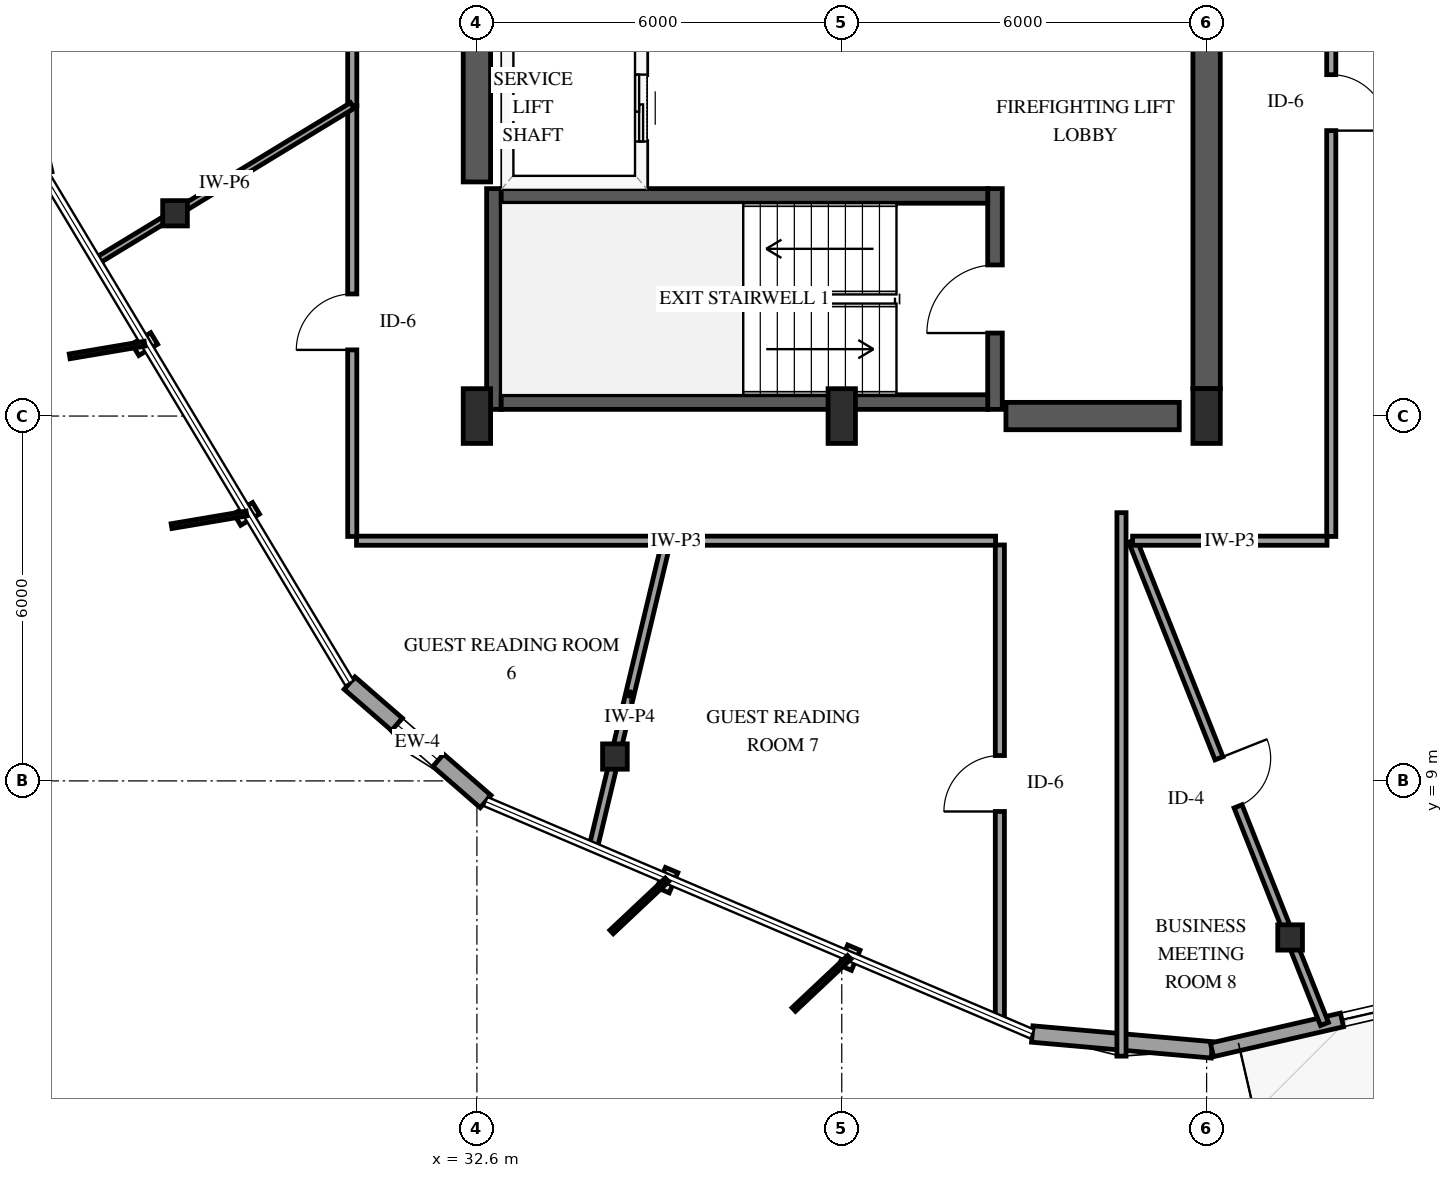
"""IFC4 building model, lengths in metres.
Left out: names, types, materials, properties, quantities, classifications, styles, units other than length and angle.
Written with IfcOpenShell. Run it as: python <this file> out.ifc"""

import sys

from ifc_helpers import new_model, si_unit, direction, frame, frame_2d, origin, origin_2d, place, context, subcontext, project, spatial, rectangle, i_section, extrude, element, fill, save


model = new_model("IFC4")
c1 = context("Model", 3, precision=1e-05, world=origin(), true_north=direction((0.0, 1.0)))
c2 = subcontext(c1, "Body", "Model", "MODEL_VIEW")
j1 = project(units=[si_unit("LENGTHUNIT", "METRE"), si_unit("PLANEANGLEUNIT", "RADIAN")], contexts=[c1])
p1 = place(None, origin())
s1 = spatial("IfcSite", under=j1, at=p1, CompositionType="ELEMENT")
p2 = place(p1, origin())
s2 = spatial("IfcBuilding", under=s1, at=p2, CompositionType="ELEMENT")
p3 = place(p2, frame((0.0, 0.0, 212.2)))
s3 = spatial("IfcBuildingStorey", under=s2, at=p3, CompositionType="ELEMENT", Elevation=212.2)
p4 = place(p3, frame((32.88, 15.11, 0.0), z_axis=(0.0, 0.0, 1.0), x_axis=(0.0, 1.0, 0.0)))
e1 = element("IfcWall", 1, at=p4, inside=s3, PredefinedType="SHEAR", context=c2, shape_type="SweptSolid", body=[
    extrude(rectangle(XDim=3.63, YDim=0.24, at=frame_2d((1.815, 0.0))), origin(), (0.0, 0.0, 1.0), 3.6),
])
p5 = place(p3, frame((41.12, 15.11, 0.0), z_axis=(0.0, 0.0, 1.0), x_axis=(0.0, 1.0, 0.0)))
e2 = element("IfcWall", 2, at=p5, inside=s3, PredefinedType="SHEAR", context=c2, shape_type="SweptSolid", body=[
    extrude(rectangle(XDim=3.63, YDim=0.24, at=frame_2d((1.815, 0.0))), origin(), (0.0, 0.0, 1.0), 3.6),
])
p6 = place(p5, frame((1.255, 0.0, 0.0)))
e3 = element("IfcOpeningElement", 3, at=p6, cuts=e2, PredefinedType="OPENING", context=c2, shape_type="SweptSolid", body=[
    extrude(rectangle(XDim=1.12, YDim=2.15, at=frame_2d((0.56, 1.075))), frame((0.0, 0.13, 0.0), z_axis=(0.0, -1.0, 0.0), x_axis=(1.0, 0.0, 0.0)), (0.0, 0.0, 1.0), 0.26),
])
for number, where, z_axis, x_axis in (
    (4, (33.0, 15.23, 0.0), (0.0, 0.0, 1.0), (1.0, 0.0, 0.0)),
    (5, (33.0, 18.62, 0.0), (0.0, 0.0, 1.0), (1.0, 0.0, 0.0)),
):
    element("IfcWall", number, at=place(p3, frame(where, z_axis=z_axis, x_axis=x_axis)), inside=s3, PredefinedType="SHEAR", context=c2, shape_type="SweptSolid", body=[
        extrude(rectangle(XDim=8.0, YDim=0.24, at=frame_2d((4.0, 0.0))), origin(), (0.0, 0.0, 1.0), 3.6),
    ])
p7 = place(p3, frame((32.6, 18.85, 0.0), z_axis=(0.0, 0.0, 1.0), x_axis=(0.0, 1.0, 0.0)))
e6 = element("IfcWall", 6, at=p7, inside=s3, PredefinedType="SHEAR", context=c2, shape_type="SweptSolid", body=[
    extrude(rectangle(XDim=12.3, YDim=0.45, at=frame_2d((6.15, 0.0))), origin(), (0.0, 0.0, 1.0), 3.6),
])
p8 = place(p3, frame((41.3, 15.0, 0.0), z_axis=(0.0, 0.0, 1.0), x_axis=(1.0, 0.0, 0.0)))
e7 = element("IfcWall", 7, at=p8, inside=s3, PredefinedType="SHEAR", context=c2, shape_type="SweptSolid", body=[
    extrude(rectangle(XDim=2.85, YDim=0.45, at=frame_2d((1.425, 0.0))), origin(), (0.0, 0.0, 1.0), 3.6),
])
p9 = place(p3, frame((44.6, 15.45, 0.0), z_axis=(0.0, 0.0, 1.0), x_axis=(0.0, 1.0, 0.0)))
e8 = element("IfcWall", 8, at=p9, inside=s3, PredefinedType="SHEAR", context=c2, shape_type="SweptSolid", body=[
    extrude(rectangle(XDim=6.35, YDim=0.45, at=frame_2d((3.175, 0.0))), origin(), (0.0, 0.0, 1.0), 3.6),
])
for number, where, z_axis, x_axis in (
    (9, (32.6, 15.0, 0.0), (0.0, 0.0, 1.0), (1.0, 0.0, 0.0)),
    (10, (38.6, 15.0, 0.0), (0.0, 0.0, 1.0), (1.0, 0.0, 0.0)),
    (11, (44.6, 15.0, 0.0), (0.0, 0.0, 1.0), (1.0, 0.0, 0.0)),
):
    element("IfcColumn", number, at=place(p3, frame(where, z_axis=z_axis, x_axis=x_axis)), inside=s3, PredefinedType="PILASTER", context=c2, shape_type="SweptSolid", body=[
        extrude(rectangle(XDim=0.45, YDim=0.9, at=origin_2d()), origin(), (0.0, 0.0, 1.0), 3.6),
    ])
for number, where, z_axis, x_axis in (
    (12, (27.635, 18.334, 0.0), (0.0, 0.0, 1.0), (1.0, 0.0, 0.0)),
    (13, (34.87, 9.401, 0.0), (0.0, 0.0, 1.0), (1.0, 0.0, 0.0)),
    (14, (45.973, 6.426, 0.0), (0.0, 0.0, 1.0), (1.0, 0.0, 0.0)),
):
    element("IfcColumn", number, at=place(p3, frame(where, z_axis=z_axis, x_axis=x_axis)), inside=s3, PredefinedType="COLUMN", context=c2, shape_type="SweptSolid", body=[
        extrude(i_section(OverallWidth=0.406, OverallDepth=0.416, WebThickness=0.03, FlangeThickness=0.048, FilletRadius=0.038, at=origin_2d()), origin(), (0.0, 0.0, 1.0), 3.6),
    ])
p10 = place(p3, frame((30.506, 10.609, 0.0), z_axis=(0.0, 0.0, 1.0), x_axis=(0.754261698008, -0.656573903623, 0.0)))
e15 = element("IfcWall", 15, at=p10, inside=s3, PredefinedType="SOLIDWALL", context=c2, shape_type="SweptSolid", body=[
    extrude(rectangle(XDim=2.967, YDim=0.27, at=frame_2d((1.483, 0.0))), origin(), (0.0, 0.0, 1.0), 2.679),
])
p11 = place(p10, frame((1.033, 0.0, 0.75)))
e16 = element("IfcOpeningElement", 16, at=p11, cuts=e15, PredefinedType="OPENING", context=c2, shape_type="SweptSolid", body=[
    extrude(rectangle(XDim=0.9, YDim=1.5, at=frame_2d((0.45, 0.75))), frame((0.0, 0.145, 0.0), z_axis=(0.0, -1.0, 0.0), x_axis=(1.0, 0.0, 0.0)), (0.0, 0.0, 1.0), 0.29),
])
p12 = place(p3, frame((41.733, 4.838, 0.0), z_axis=(0.0, 0.0, 1.0), x_axis=(0.996129850025, -0.087893810296, 0.0)))
e17 = element("IfcWall", 17, at=p12, inside=s3, PredefinedType="SOLIDWALL", context=c2, shape_type="SweptSolid", body=[
    extrude(rectangle(XDim=2.967, YDim=0.27, at=frame_2d((1.483, 0.0))), origin(), (0.0, 0.0, 1.0), 2.679),
])
p13 = place(p3, frame((44.688, 4.577, 0.0), z_axis=(0.0, 0.0, 1.0), x_axis=(0.974525807261, 0.224275390941, 0.0)))
e18 = element("IfcWall", 18, at=p13, inside=s3, PredefinedType="SOLIDWALL", context=c2, shape_type="SweptSolid", body=[
    extrude(rectangle(XDim=9.769, YDim=0.23, at=frame_2d((4.884, 0.0))), origin(), (0.0, 0.0, 1.0), 2.679),
])
p14 = place(p13, frame((4.385, 0.0, 0.0)))
e19 = element("IfcOpeningElement", 19, at=p14, cuts=e18, PredefinedType="OPENING", context=c2, shape_type="SweptSolid", body=[
    extrude(rectangle(XDim=1.0, YDim=2.15, at=frame_2d((0.5, 1.075))), frame((0.0, 0.125, 0.0), z_axis=(0.0, -1.0, 0.0), x_axis=(1.0, 0.0, 0.0)), (0.0, 0.0, 1.0), 0.25),
])
p15 = place(p13, frame((2.194, 0.0, 0.72)))
e20 = element("IfcOpeningElement", 20, at=p15, cuts=e18, PredefinedType="OPENING", context=c2, shape_type="SweptSolid", body=[
    extrude(rectangle(XDim=1.2, YDim=1.6, at=frame_2d((0.6, 0.8))), frame((0.0, 0.125, 0.0), z_axis=(0.0, -1.0, 0.0), x_axis=(1.0, 0.0, 0.0)), (0.0, 0.0, 1.0), 0.25),
])
p16 = place(p13, frame((6.024, 0.0, 0.72)))
e21 = element("IfcOpeningElement", 21, at=p16, cuts=e18, PredefinedType="OPENING", context=c2, shape_type="SweptSolid", body=[
    extrude(rectangle(XDim=1.2, YDim=1.6, at=frame_2d((0.6, 0.8))), frame((0.0, 0.125, 0.0), z_axis=(0.0, -1.0, 0.0), x_axis=(1.0, 0.0, 0.0)), (0.0, 0.0, 1.0), 0.25),
])
p17 = place(p3, frame((35.3, 18.79, 0.0), z_axis=(0.0, 0.0, 1.0), x_axis=(0.0, 1.0, 0.0)))
e22 = element("IfcWall", 22, at=p17, inside=s3, PredefinedType="SOLIDWALL", context=c2, shape_type="SweptSolid", body=[
    extrude(rectangle(XDim=2.55, YDim=0.185, at=frame_2d((1.275, 0.0))), origin(), (0.0, 0.0, 1.0), 3.3),
])
p18 = place(p17, frame((0.725, 0.0, 0.0)))
e23 = element("IfcOpeningElement", 23, at=p18, cuts=e22, PredefinedType="OPENING", context=c2, shape_type="SweptSolid", body=[
    extrude(rectangle(XDim=1.1, YDim=2.15, at=frame_2d((0.55, 1.075))), frame((0.0, 0.103, 0.0), z_axis=(0.0, -1.0, 0.0), x_axis=(1.0, 0.0, 0.0)), (0.0, 0.0, 1.0), 0.205),
])
p19 = place(p3, frame((46.65, 27.258, 0.0), z_axis=(0.0, 0.0, 1.0), x_axis=(0.0, -1.0, 0.0)))
e24 = element("IfcWall", 24, at=p19, inside=s3, PredefinedType="PARTITIONING", context=c2, shape_type="SweptSolid", body=[
    extrude(rectangle(XDim=14.238, YDim=0.15, at=frame_2d((7.119, 0.0))), origin(), (0.0, 0.0, 1.0), 3.3),
])
p20 = place(p19, frame((6.644, 0.0, 0.0)))
e25 = element("IfcOpeningElement", 25, at=p20, cuts=e24, PredefinedType="OPENING", context=c2, shape_type="SweptSolid", body=[
    extrude(rectangle(XDim=0.92, YDim=2.12, at=frame_2d((0.46, 1.06))), frame((0.0, 0.085, 0.0), z_axis=(0.0, -1.0, 0.0), x_axis=(1.0, 0.0, 0.0)), (0.0, 0.0, 1.0), 0.17),
])
p21 = place(p3, frame((43.383, 12.95, 0.0), z_axis=(0.0, 0.0, 1.0), x_axis=(0.368991960786, -0.929432586515, 0.0)))
e26 = element("IfcWall", 26, at=p21, inside=s3, PredefinedType="PARTITIONING", context=c2, shape_type="SweptSolid", body=[
    extrude(rectangle(XDim=8.55, YDim=0.14, at=frame_2d((4.275, 0.0))), origin(), (0.0, 0.0, 1.0), 2.595),
])
p22 = place(p21, frame((3.85, 0.0, 0.0)))
e27 = element("IfcOpeningElement", 27, at=p22, cuts=e26, PredefinedType="OPENING", context=c2, shape_type="SweptSolid", body=[
    extrude(rectangle(XDim=0.85, YDim=2.1, at=frame_2d((0.425, 1.05))), frame((0.0, 0.08, 0.0), z_axis=(0.0, -1.0, 0.0), x_axis=(1.0, 0.0, 0.0)), (0.0, 0.0, 1.0), 0.16),
])
p23 = place(p3, frame((30.55, 20.106, 0.0), z_axis=(0.0, 0.0, 1.0), x_axis=(0.0, 1.0, 0.0)))
e28 = element("IfcWall", 28, at=p23, inside=s3, PredefinedType="PARTITIONING", context=c2, shape_type="SweptSolid", body=[
    extrude(rectangle(XDim=8.245, YDim=0.15, at=frame_2d((4.123, 0.0))), origin(), (0.0, 0.0, 1.0), 3.3),
])
p24 = place(p23, frame((3.647, 0.0, 0.0)))
e29 = element("IfcOpeningElement", 29, at=p24, cuts=e28, PredefinedType="OPENING", context=c2, shape_type="SweptSolid", body=[
    extrude(rectangle(XDim=0.92, YDim=2.12, at=frame_2d((0.46, 1.06))), frame((0.0, 0.085, 0.0), z_axis=(0.0, -1.0, 0.0), x_axis=(1.0, 0.0, 0.0)), (0.0, 0.0, 1.0), 0.17),
])
p25 = place(p3, frame((41.2, 5.064, 0.0), z_axis=(0.0, 0.0, 1.0), x_axis=(0.0, 1.0, 0.0)))
e30 = element("IfcWall", 30, at=p25, inside=s3, PredefinedType="PARTITIONING", context=c2, shape_type="SweptSolid", body=[
    extrude(rectangle(XDim=7.816, YDim=0.15, at=frame_2d((3.908, 0.0))), origin(), (0.0, 0.0, 1.0), 2.678),
])
p26 = place(p25, frame((3.433, 0.0, 0.0)))
e31 = element("IfcOpeningElement", 31, at=p26, cuts=e30, PredefinedType="OPENING", context=c2, shape_type="SweptSolid", body=[
    extrude(rectangle(XDim=0.92, YDim=2.12, at=frame_2d((0.46, 1.06))), frame((0.0, 0.085, 0.0), z_axis=(0.0, -1.0, 0.0), x_axis=(1.0, 0.0, 0.0)), (0.0, 0.0, 1.0), 0.17),
])
p27 = place(p3, frame((30.55, 13.02, 0.0), z_axis=(0.0, 0.0, 1.0), x_axis=(0.0, 1.0, 0.0)))
e32 = element("IfcWall", 32, at=p27, inside=s3, PredefinedType="PARTITIONING", context=c2, shape_type="SweptSolid", body=[
    extrude(rectangle(XDim=7.086, YDim=0.15, at=frame_2d((3.543, 0.0))), origin(), (0.0, 0.0, 1.0), 3.3),
])
p28 = place(p27, frame((3.068, 0.0, 0.0)))
e33 = element("IfcOpeningElement", 33, at=p28, cuts=e32, PredefinedType="OPENING", context=c2, shape_type="SweptSolid", body=[
    extrude(rectangle(XDim=0.92, YDim=2.12, at=frame_2d((0.46, 1.06))), frame((0.0, 0.085, 0.0), z_axis=(0.0, -1.0, 0.0), x_axis=(1.0, 0.0, 0.0)), (0.0, 0.0, 1.0), 0.17),
])
p29 = place(p3, frame((41.13, 12.95, 0.0), z_axis=(0.0, 0.0, 1.0), x_axis=(-1.0, 0.0, 0.0)))
e34 = element("IfcWall", 34, at=p29, inside=s3, PredefinedType="PARTITIONING", context=c2, shape_type="SweptSolid", body=[
    extrude(rectangle(XDim=5.411, YDim=0.15, at=frame_2d((2.706, 0.0))), origin(), (0.0, 0.0, 1.0), 3.3),
])
p30 = place(p3, frame((35.719, 12.95, 0.0), z_axis=(0.0, 0.0, 1.0), x_axis=(-0.23263906279, -0.972563142662, 0.0)))
e35 = element("IfcWall", 35, at=p30, inside=s3, PredefinedType="PARTITIONING", context=c2, shape_type="SweptSolid", body=[
    extrude(rectangle(XDim=5.184, YDim=0.14, at=frame_2d((2.592, 0.0))), origin(), (0.0, 0.0, 1.0), 2.595),
])
p31 = place(p3, frame((35.719, 12.95, 0.0), z_axis=(0.0, 0.0, 1.0), x_axis=(-1.0, 0.0, 0.0)))
e36 = element("IfcWall", 36, at=p31, inside=s3, PredefinedType="PARTITIONING", context=c2, shape_type="SweptSolid", body=[
    extrude(rectangle(XDim=5.099, YDim=0.15, at=frame_2d((2.549, 0.0))), origin(), (0.0, 0.0, 1.0), 3.3),
])
p32 = place(p3, frame((30.55, 20.106, 0.0), z_axis=(0.0, 0.0, 1.0), x_axis=(-0.854463677574, -0.519511139156, 0.0)))
e37 = element("IfcWall", 37, at=p32, inside=s3, PredefinedType="PARTITIONING", context=c2, shape_type="SweptSolid", body=[
    extrude(rectangle(XDim=4.924, YDim=0.11, at=frame_2d((2.462, 0.0))), origin(), (0.0, 0.0, 1.0), 3.3),
])
p33 = place(p3, frame((46.58, 12.95, 0.0), z_axis=(0.0, 0.0, 1.0), x_axis=(-1.0, 0.0, 0.0)))
e38 = element("IfcWall", 38, at=p33, inside=s3, PredefinedType="PARTITIONING", context=c2, shape_type="SweptSolid", body=[
    extrude(rectangle(XDim=3.197, YDim=0.15, at=frame_2d((1.599, 0.0))), origin(), (0.0, 0.0, 1.0), 3.3),
])
p34 = place(p3, frame((43.2, 13.411, 0.0), z_axis=(0.0, 0.0, 1.0), x_axis=(0.0, -1.0, 0.0)))
e39 = element("IfcWall", 39, at=p34, inside=s3, PredefinedType="PARTITIONING", context=c2, shape_type="SweptSolid", body=[
    extrude(rectangle(XDim=8.937, YDim=0.15, at=frame_2d((4.468, 0.0))), origin(), (0.0, 0.0, 1.0), 3.3),
])
p35 = place(p11, origin())
e40 = element("IfcWindow", 40, at=p35, inside=s3, PartitioningType="SINGLE_PANEL", PredefinedType="WINDOW", context=c2, shape_type="SweptSolid", body=[
    extrude(rectangle(XDim=0.9, YDim=1.5, at=frame_2d((0.45, 0.75))), frame((0.0, 0.03, 0.0), z_axis=(0.0, -1.0, 0.0), x_axis=(1.0, 0.0, 0.0)), (0.0, 0.0, 1.0), 0.06),
])
fill(e16, e40)
p36 = place(p15, origin())
e41 = element("IfcWindow", 41, at=p36, inside=s3, PartitioningType="SINGLE_PANEL", PredefinedType="WINDOW", context=c2, shape_type="SweptSolid", body=[
    extrude(rectangle(XDim=1.2, YDim=1.6, at=frame_2d((0.6, 0.8))), frame((0.0, 0.03, 0.0), z_axis=(0.0, -1.0, 0.0), x_axis=(1.0, 0.0, 0.0)), (0.0, 0.0, 1.0), 0.06),
])
fill(e20, e41)
p37 = place(p18, origin())
e42 = element("IfcDoor", 42, at=p37, inside=s3, OperationType="SLIDING_TO_LEFT", PredefinedType="DOOR", context=c2, shape_type="SweptSolid", body=[
    extrude(rectangle(XDim=1.1, YDim=2.15, at=frame_2d((0.55, 1.075))), frame((0.0, 0.025, 0.0), z_axis=(0.0, -1.0, 0.0), x_axis=(1.0, 0.0, 0.0)), (0.0, 0.0, 1.0), 0.05),
])
fill(e23, e42)
p38 = place(p6, origin())
e43 = element("IfcDoor", 43, at=p38, inside=s3, OperationType="SINGLE_SWING_LEFT", PredefinedType="DOOR", context=c2, shape_type="SweptSolid", body=[
    extrude(rectangle(XDim=1.12, YDim=2.15, at=frame_2d((0.56, 1.075))), frame((0.0, 0.025, 0.0), z_axis=(0.0, -1.0, 0.0), x_axis=(1.0, 0.0, 0.0)), (0.0, 0.0, 1.0), 0.05),
])
fill(e3, e43)
p39 = place(p20, origin())
e44 = element("IfcDoor", 44, at=p39, inside=s3, OperationType="SINGLE_SWING_RIGHT", PredefinedType="DOOR", context=c2, shape_type="SweptSolid", body=[
    extrude(rectangle(XDim=0.92, YDim=2.12, at=frame_2d((0.46, 1.06))), frame((0.0, 0.025, 0.0), z_axis=(0.0, -1.0, 0.0), x_axis=(1.0, 0.0, 0.0)), (0.0, 0.0, 1.0), 0.05),
])
fill(e25, e44)
p40 = place(p22, origin())
e45 = element("IfcDoor", 45, at=p40, inside=s3, OperationType="SINGLE_SWING_LEFT", PredefinedType="DOOR", context=c2, shape_type="SweptSolid", body=[
    extrude(rectangle(XDim=0.85, YDim=2.1, at=frame_2d((0.425, 1.05))), frame((0.0, 0.025, 0.0), z_axis=(0.0, -1.0, 0.0), x_axis=(1.0, 0.0, 0.0)), (0.0, 0.0, 1.0), 0.05),
])
fill(e27, e45)
p41 = place(p26, origin())
e46 = element("IfcDoor", 46, at=p41, inside=s3, OperationType="SINGLE_SWING_LEFT", PredefinedType="DOOR", context=c2, shape_type="SweptSolid", body=[
    extrude(rectangle(XDim=0.92, YDim=2.12, at=frame_2d((0.46, 1.06))), frame((0.0, 0.025, 0.0), z_axis=(0.0, -1.0, 0.0), x_axis=(1.0, 0.0, 0.0)), (0.0, 0.0, 1.0), 0.05),
])
fill(e31, e46)
p42 = place(p28, origin())
e47 = element("IfcDoor", 47, at=p42, inside=s3, OperationType="SINGLE_SWING_LEFT", PredefinedType="DOOR", context=c2, shape_type="SweptSolid", body=[
    extrude(rectangle(XDim=0.92, YDim=2.12, at=frame_2d((0.46, 1.06))), frame((0.0, 0.025, 0.0), z_axis=(0.0, -1.0, 0.0), x_axis=(1.0, 0.0, 0.0)), (0.0, 0.0, 1.0), 0.05),
])
fill(e33, e47)
save(model, sys.argv[1])
